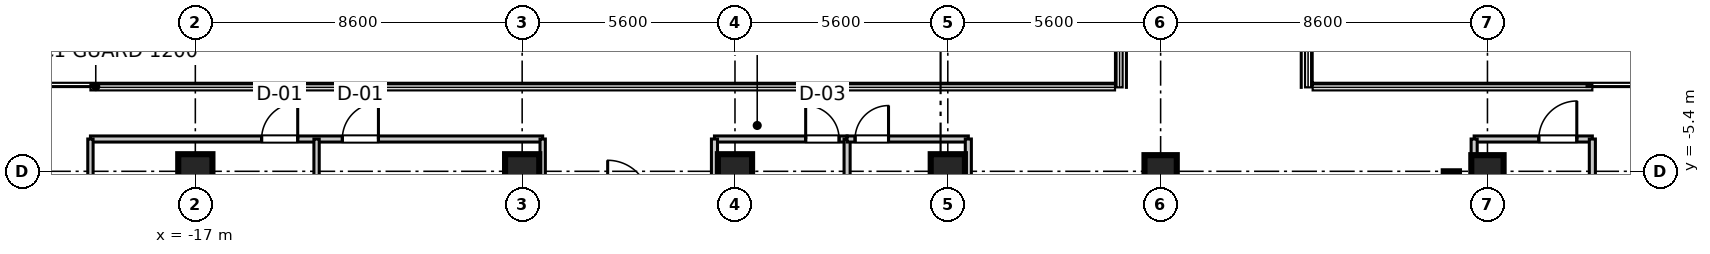
"""IFC4 building model, lengths in metres.
Left out: names, types, materials, properties, quantities, classifications, styles, units other than length and angle.
Written with IfcOpenShell. Run it as: python <this file> out.ifc"""

import sys

from ifc_helpers import new_model, si_unit, direction, frame, frame_2d, origin, origin_2d, place, context, subcontext, project, spatial, rectangle, extrude, source, transform, mapped, element, fill, save


model = new_model("IFC4")
c1 = context("Model", 3, precision=1e-05, world=origin(), true_north=direction((0.0, 1.0)))
c2 = subcontext(c1, "Body", "Model", "MODEL_VIEW")
j1 = project(units=[si_unit("LENGTHUNIT", "METRE"), si_unit("PLANEANGLEUNIT", "RADIAN")], contexts=[c1])
p1 = place(None, origin())
s1 = spatial("IfcSite", under=j1, at=p1, CompositionType="ELEMENT")
p2 = place(p1, origin())
s2 = spatial("IfcBuilding", under=s1, at=p2, CompositionType="ELEMENT")
p3 = place(p2, frame((0.0, 0.0, 288.8)))
s3 = spatial("IfcBuildingStorey", under=s2, at=p3, CompositionType="ELEMENT", Elevation=288.8)
m1 = source(origin(), c2, "Body", "SweptSolid", [
    extrude(rectangle(XDim=0.9, YDim=0.9, at=origin_2d()), origin(), (0.0, 0.0, 1.0), 3.805),
])
for number, where, z_axis, x_axis in (
    (1, (-17.0, -5.4, 0.0), (0.0, 0.0, 1.0), (1.0, 0.0, 0.0)),
    (2, (-8.4, -5.4, 0.0), (0.0, 0.0, 1.0), (1.0, 0.0, 0.0)),
    (3, (-2.8, -5.4, 0.0), (0.0, 0.0, 1.0), (1.0, 0.0, 0.0)),
    (4, (2.8, -5.4, 0.0), (0.0, 0.0, 1.0), (1.0, 0.0, 0.0)),
):
    element("IfcColumn", number, at=place(p3, frame(where, z_axis=z_axis, x_axis=x_axis)), inside=s3, PredefinedType="COLUMN", context=c2, shape_type="MappedRepresentation", body=[
        mapped(m1, transform((0.0, 0.0, 0.0), scale=1.0)),
    ])
m2 = source(origin(), c2, "Body", "SweptSolid", [
    extrude(rectangle(XDim=0.85, YDim=0.85, at=origin_2d()), origin(), (0.0, 0.0, 1.0), 3.805),
])
for number, where, z_axis, x_axis in (
    (5, (8.4, -5.4, 0.0), (0.0, 0.0, 1.0), (1.0, 0.0, 0.0)),
    (6, (17.0, -5.4, 0.0), (0.0, 0.0, 1.0), (1.0, 0.0, 0.0)),
):
    element("IfcColumn", number, at=place(p3, frame(where, z_axis=z_axis, x_axis=x_axis)), inside=s3, PredefinedType="PILASTER", context=c2, shape_type="MappedRepresentation", body=[
        mapped(m2, transform((0.0, 0.0, 0.0), scale=1.0)),
    ])
m3 = source(origin(), c2, "Body", "SweptSolid", [
    extrude(rectangle(XDim=11.6, YDim=0.4, at=frame_2d((5.8, 0.0))), origin(), (0.0, 0.0, 1.0), 3.55),
])
p4 = place(p3, frame((16.05, -17.0, 0.0), z_axis=(0.0, 0.0, 1.0), x_axis=(0.0, 1.0, 0.0)))
e7 = element("IfcWall", 7, at=p4, inside=s3, PredefinedType="SHEAR", context=c2, shape_type="MappedRepresentation", body=[
    mapped(m3, transform((0.0, 0.0, 0.0), scale=1.0)),
])
m4 = source(origin(), c2, "Body", "SweptSolid", [
    extrude(rectangle(XDim=3.11, YDim=0.16, at=frame_2d((1.555, 0.0))), origin(), (0.0, 0.0, 1.0), 2.89),
])
p5 = place(p3, frame((16.65, -4.55, 0.0), z_axis=(0.0, 0.0, 1.0), x_axis=(1.0, 0.0, 0.0)))
e8 = element("IfcWall", 8, at=p5, inside=s3, PredefinedType="PARTITIONING", context=c2, shape_type="MappedRepresentation", body=[
    mapped(m4, transform((0.0, 0.0, 0.0), scale=1.0)),
])
p6 = place(p5, frame((1.701, 0.0, 0.0)))
e9 = element("IfcOpeningElement", 9, at=p6, cuts=e8, PredefinedType="OPENING", context=c2, shape_type="SweptSolid", body=[
    extrude(rectangle(XDim=1.0, YDim=2.1, at=frame_2d((0.5, 1.05))), frame((0.0, 0.09, 0.0), z_axis=(0.0, -1.0, 0.0), x_axis=(1.0, 0.0, 0.0)), (0.0, 0.0, 1.0), 0.18),
])
m5 = source(origin(), c2, "Body", "SweptSolid", [
    extrude(rectangle(XDim=17.95, YDim=0.16, at=frame_2d((8.975, 0.0))), origin(), (0.0, 0.0, 1.0), 2.89),
])
p7 = place(p3, frame((16.65, -22.5, 0.0), z_axis=(0.0, 0.0, 1.0), x_axis=(0.0, 1.0, 0.0)))
e10 = element("IfcWall", 10, at=p7, inside=s3, PredefinedType="PARTITIONING", context=c2, shape_type="MappedRepresentation", body=[
    mapped(m5, transform((0.0, 0.0, 0.0), scale=1.0)),
])
m6 = source(origin(), c2, "Body", "SweptSolid", [
    extrude(rectangle(XDim=16.53, YDim=0.16, at=frame_2d((8.265, 0.0))), origin(), (0.0, 0.0, 1.0), 2.89),
])
p8 = place(p3, frame((19.76, -21.08, 0.0), z_axis=(0.0, 0.0, 1.0), x_axis=(0.0, 1.0, 0.0)))
e11 = element("IfcWall", 11, at=p8, inside=s3, PredefinedType="PARTITIONING", context=c2, shape_type="MappedRepresentation", body=[
    mapped(m6, transform((0.0, 0.0, 0.0), scale=1.0)),
])
m7 = source(origin(), c2, "Body", "SweptSolid", [
    extrude(rectangle(XDim=11.9, YDim=0.16, at=frame_2d((5.95, 0.0))), origin(), (0.0, 0.0, 1.0), 2.89),
])
p9 = place(p3, frame((-19.76, -4.55, 0.0), z_axis=(0.0, 0.0, 1.0), x_axis=(1.0, 0.0, 0.0)))
e12 = element("IfcWall", 12, at=p9, inside=s3, PredefinedType="PARTITIONING", context=c2, shape_type="MappedRepresentation", body=[
    mapped(m7, transform((0.0, 0.0, 0.0), scale=1.0)),
])
p10 = place(p9, frame((4.504, 0.0, 0.0)))
e13 = element("IfcOpeningElement", 13, at=p10, cuts=e12, PredefinedType="OPENING", context=c2, shape_type="SweptSolid", body=[
    extrude(rectangle(XDim=0.95, YDim=2.1, at=frame_2d((0.475, 1.05))), frame((0.0, 0.09, 0.0), z_axis=(0.0, -1.0, 0.0), x_axis=(1.0, 0.0, 0.0)), (0.0, 0.0, 1.0), 0.18),
])
p11 = place(p9, frame((6.628, 0.0, 0.0)))
e14 = element("IfcOpeningElement", 14, at=p11, cuts=e12, PredefinedType="OPENING", context=c2, shape_type="SweptSolid", body=[
    extrude(rectangle(XDim=0.95, YDim=2.1, at=frame_2d((0.475, 1.05))), frame((0.0, 0.09, 0.0), z_axis=(0.0, -1.0, 0.0), x_axis=(1.0, 0.0, 0.0)), (0.0, 0.0, 1.0), 0.18),
])
m8 = source(origin(), c2, "Body", "SweptSolid", [
    extrude(rectangle(XDim=16.53, YDim=0.14, at=frame_2d((8.265, 0.0))), origin(), (0.0, 0.0, 1.0), 2.89),
])
p12 = place(p3, frame((-19.76, -21.08, 0.0), z_axis=(0.0, 0.0, 1.0), x_axis=(0.0, 1.0, 0.0)))
e15 = element("IfcWall", 15, at=p12, inside=s3, PredefinedType="PARTITIONING", context=c2, shape_type="MappedRepresentation", body=[
    mapped(m8, transform((0.0, 0.0, 0.0), scale=1.0)),
])
m9 = source(origin(), c2, "Body", "SweptSolid", [
    extrude(rectangle(XDim=17.95, YDim=0.14, at=frame_2d((8.975, 0.0))), origin(), (0.0, 0.0, 1.0), 2.89),
])
for number, where, z_axis, x_axis in (
    (16, (-7.86, -22.5, 0.0), (0.0, 0.0, 1.0), (0.0, 1.0, 0.0)),
    (17, (-13.81, -22.5, 0.0), (0.0, 0.0, 1.0), (0.0, 1.0, 0.0)),
):
    element("IfcWall", number, at=place(p3, frame(where, z_axis=z_axis, x_axis=x_axis)), inside=s3, PredefinedType="PARTITIONING", context=c2, shape_type="MappedRepresentation", body=[
        mapped(m9, transform((0.0, 0.0, 0.0), scale=1.0)),
    ])
m10 = source(origin(), c2, "Body", "SweptSolid", [
    extrude(rectangle(XDim=3.49, YDim=0.16, at=frame_2d((1.745, 0.0))), origin(), (0.0, 0.0, 1.0), 2.89),
])
p13 = place(p3, frame((-3.34, -4.55, 0.0), z_axis=(0.0, 0.0, 1.0), x_axis=(1.0, 0.0, 0.0)))
e18 = element("IfcWall", 18, at=p13, inside=s3, PredefinedType="PARTITIONING", context=c2, shape_type="MappedRepresentation", body=[
    mapped(m10, transform((0.0, 0.0, 0.0), scale=1.0)),
])
p14 = place(p13, frame((2.4, 0.0, 0.0)))
e19 = element("IfcOpeningElement", 19, at=p14, cuts=e18, PredefinedType="OPENING", context=c2, shape_type="SweptSolid", body=[
    extrude(rectangle(XDim=0.88, YDim=2.1, at=frame_2d((0.44, 1.05))), frame((0.0, 0.09, 0.0), z_axis=(0.0, -1.0, 0.0), x_axis=(1.0, 0.0, 0.0)), (0.0, 0.0, 1.0), 0.18),
])
for number, where, z_axis, x_axis in (
    (20, (-3.34, -22.5, 0.0), (0.0, 0.0, 1.0), (0.0, 1.0, 0.0)),
    (21, (0.15, -22.5, 0.0), (0.0, 0.0, 1.0), (0.0, 1.0, 0.0)),
):
    element("IfcWall", number, at=place(p3, frame(where, z_axis=z_axis, x_axis=x_axis)), inside=s3, PredefinedType="PARTITIONING", context=c2, shape_type="MappedRepresentation", body=[
        mapped(m5, transform((0.0, 0.0, 0.0), scale=1.0)),
    ])
m11 = source(origin(), c2, "Body", "SweptSolid", [
    extrude(rectangle(XDim=3.19, YDim=0.16, at=frame_2d((1.595, 0.0))), origin(), (0.0, 0.0, 1.0), 2.89),
])
p15 = place(p3, frame((0.15, -4.55, 0.0), z_axis=(0.0, 0.0, 1.0), x_axis=(1.0, 0.0, 0.0)))
e22 = element("IfcWall", 22, at=p15, inside=s3, PredefinedType="PARTITIONING", context=c2, shape_type="MappedRepresentation", body=[
    mapped(m11, transform((0.0, 0.0, 0.0), scale=1.0)),
])
p16 = place(p15, frame((0.21, 0.0, 0.0)))
e23 = element("IfcOpeningElement", 23, at=p16, cuts=e22, PredefinedType="OPENING", context=c2, shape_type="SweptSolid", body=[
    extrude(rectangle(XDim=0.88, YDim=2.1, at=frame_2d((0.44, 1.05))), frame((0.0, 0.09, 0.0), z_axis=(0.0, -1.0, 0.0), x_axis=(1.0, 0.0, 0.0)), (0.0, 0.0, 1.0), 0.18),
])
p17 = place(p3, frame((3.34, -22.5, 0.0), z_axis=(0.0, 0.0, 1.0), x_axis=(0.0, 1.0, 0.0)))
e24 = element("IfcWall", 24, at=p17, inside=s3, PredefinedType="PARTITIONING", context=c2, shape_type="MappedRepresentation", body=[
    mapped(m5, transform((0.0, 0.0, 0.0), scale=1.0)),
])
m12 = source(origin(), c2, "Body", "SweptSolid", [
    extrude(rectangle(XDim=1.0, YDim=2.1, at=frame_2d((0.5, 1.05))), frame((0.0, 0.025, 0.0), z_axis=(0.0, -1.0, 0.0), x_axis=(1.0, 0.0, 0.0)), (0.0, 0.0, 1.0), 0.05),
])
p18 = place(p6, frame((1.0, 0.0, 0.0), z_axis=(0.0, 0.0, 1.0), x_axis=(-1.0, 0.0, 0.0)))
e25 = element("IfcDoor", 25, at=p18, inside=s3, OperationType="SINGLE_SWING_RIGHT", PredefinedType="DOOR", context=c2, shape_type="MappedRepresentation", body=[
    mapped(m12, transform((0.0, 0.0, 0.0), scale=1.0)),
])
fill(e9, e25)
m13 = source(origin(), c2, "Body", "SweptSolid", [
    extrude(rectangle(XDim=0.95, YDim=2.1, at=frame_2d((0.475, 1.05))), frame((0.0, 0.025, 0.0), z_axis=(0.0, -1.0, 0.0), x_axis=(1.0, 0.0, 0.0)), (0.0, 0.0, 1.0), 0.05),
])
p19 = place(p10, frame((0.95, 0.0, 0.0), z_axis=(0.0, 0.0, 1.0), x_axis=(-1.0, 0.0, 0.0)))
e26 = element("IfcDoor", 26, at=p19, inside=s3, OperationType="SINGLE_SWING_RIGHT", PredefinedType="DOOR", context=c2, shape_type="MappedRepresentation", body=[
    mapped(m13, transform((0.0, 0.0, 0.0), scale=1.0)),
])
fill(e13, e26)
p20 = place(p11, frame((0.95, 0.0, 0.0), z_axis=(0.0, 0.0, 1.0), x_axis=(-1.0, 0.0, 0.0)))
e27 = element("IfcDoor", 27, at=p20, inside=s3, OperationType="SINGLE_SWING_RIGHT", PredefinedType="DOOR", context=c2, shape_type="MappedRepresentation", body=[
    mapped(m13, transform((0.0, 0.0, 0.0), scale=1.0)),
])
fill(e14, e27)
m14 = source(origin(), c2, "Body", "SweptSolid", [
    extrude(rectangle(XDim=0.88, YDim=2.1, at=frame_2d((0.44, 1.05))), frame((0.0, 0.025, 0.0), z_axis=(0.0, -1.0, 0.0), x_axis=(1.0, 0.0, 0.0)), (0.0, 0.0, 1.0), 0.05),
])
p21 = place(p14, frame((0.88, 0.0, 0.0), z_axis=(0.0, 0.0, 1.0), x_axis=(-1.0, 0.0, 0.0)))
e28 = element("IfcDoor", 28, at=p21, inside=s3, OperationType="SINGLE_SWING_LEFT", PredefinedType="DOOR", context=c2, shape_type="MappedRepresentation", body=[
    mapped(m14, transform((0.0, 0.0, 0.0), scale=1.0)),
])
fill(e19, e28)
p22 = place(p16, frame((0.88, 0.0, 0.0), z_axis=(0.0, 0.0, 1.0), x_axis=(-1.0, 0.0, 0.0)))
e29 = element("IfcDoor", 29, at=p22, inside=s3, OperationType="SINGLE_SWING_RIGHT", PredefinedType="DOOR", context=c2, shape_type="MappedRepresentation", body=[
    mapped(m14, transform((0.0, 0.0, 0.0), scale=1.0)),
])
fill(e23, e29)
save(model, sys.argv[1])
